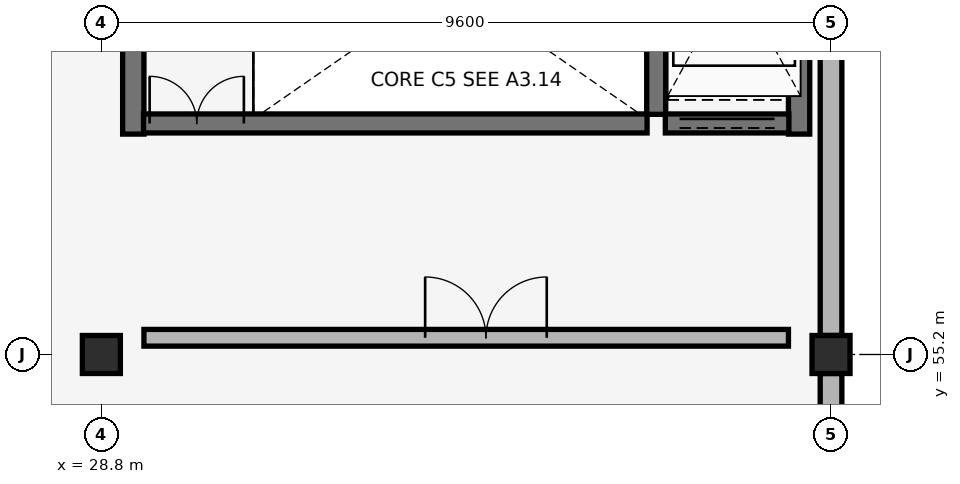
"""IFC4 building model, lengths in metres.
Left out: names, types, materials, properties, quantities, classifications, styles, units other than length and angle.
Written with IfcOpenShell. Run it as: python <this file> out.ifc"""

import sys

from ifc_helpers import new_model, si_unit, direction, frame, frame_2d, origin, origin_2d, place, context, subcontext, project, spatial, rectangle, extrude, element, fill, save


model = new_model("IFC4")
c1 = context("Model", 3, precision=1e-05, world=origin(), true_north=direction((0.0, 1.0)))
c2 = subcontext(c1, "Body", "Model", "MODEL_VIEW")
j1 = project(units=[si_unit("LENGTHUNIT", "METRE"), si_unit("PLANEANGLEUNIT", "RADIAN")], contexts=[c1])
p1 = place(None, origin())
s1 = spatial("IfcSite", under=j1, at=p1, CompositionType="ELEMENT")
p2 = place(p1, origin())
s2 = spatial("IfcBuilding", under=s1, at=p2, CompositionType="ELEMENT")
p3 = place(p2, frame((0.0, 0.0, 12.58)))
s3 = spatial("IfcBuildingStorey", under=s2, at=p3, CompositionType="ELEMENT", Elevation=12.58)
for number, where, z_axis, x_axis in (
    (1, (28.8, 55.2, 0.0), (0.0, 0.0, 1.0), (1.0, 0.0, 0.0)),
    (2, (38.4, 55.2, 0.0), (0.0, 0.0, 1.0), (1.0, 0.0, 0.0)),
):
    element("IfcColumn", number, at=place(p3, frame(where, z_axis=z_axis, x_axis=x_axis)), inside=s3, PredefinedType="COLUMN", context=c2, shape_type="SweptSolid", body=[
        extrude(rectangle(XDim=0.5, YDim=0.5, at=origin_2d()), origin(), (0.0, 0.0, 1.0), 4.08),
    ])
p4 = place(p3, frame((38.4, 48.25, 0.0), z_axis=(0.0, 0.0, 1.0), x_axis=(0.0, 1.0, 0.0)))
e3 = element("IfcWall", 3, at=p4, inside=s3, PredefinedType="SOLIDWALL", context=c2, shape_type="SweptSolid", body=[
    extrude(rectangle(XDim=6.7, YDim=0.285, at=frame_2d((3.35, 0.0))), origin(), (0.0, 0.0, 1.0), 3.06),
])
p5 = place(p4, frame((1.165, 0.0, 0.88)))
e4 = element("IfcOpeningElement", 4, at=p5, cuts=e3, PredefinedType="OPENING", context=c2, shape_type="SweptSolid", body=[
    extrude(rectangle(XDim=1.02, YDim=1.88, at=frame_2d((0.51, 0.94))), frame((0.0, 0.152, 0.0), z_axis=(0.0, -1.0, 0.0), x_axis=(1.0, 0.0, 0.0)), (0.0, 0.0, 1.0), 0.305),
])
p6 = place(p4, frame((2.84, 0.0, 0.88)))
e5 = element("IfcOpeningElement", 5, at=p6, cuts=e3, PredefinedType="OPENING", context=c2, shape_type="SweptSolid", body=[
    extrude(rectangle(XDim=1.02, YDim=1.88, at=frame_2d((0.51, 0.94))), frame((0.0, 0.152, 0.0), z_axis=(0.0, -1.0, 0.0), x_axis=(1.0, 0.0, 0.0)), (0.0, 0.0, 1.0), 0.305),
])
p7 = place(p4, frame((4.515, 0.0, 0.88)))
e6 = element("IfcOpeningElement", 6, at=p7, cuts=e3, PredefinedType="OPENING", context=c2, shape_type="SweptSolid", body=[
    extrude(rectangle(XDim=1.02, YDim=1.88, at=frame_2d((0.51, 0.94))), frame((0.0, 0.152, 0.0), z_axis=(0.0, -1.0, 0.0), x_axis=(1.0, 0.0, 0.0)), (0.0, 0.0, 1.0), 0.305),
])
p8 = place(p3, frame((38.4, 55.45, 0.0), z_axis=(0.0, 0.0, 1.0), x_axis=(0.0, 1.0, 0.0)))
e7 = element("IfcWall", 7, at=p8, inside=s3, PredefinedType="SOLIDWALL", context=c2, shape_type="SweptSolid", body=[
    extrude(rectangle(XDim=6.7, YDim=0.285, at=frame_2d((3.35, 0.0))), origin(), (0.0, 0.0, 1.0), 3.06),
])
for number, where, z_axis, x_axis in (
    (8, (29.22, 58.1, 0.0), (0.0, 0.0, 1.0), (0.0, 1.0, 0.0)),
    (9, (37.98, 58.1, 0.0), (0.0, 0.0, 1.0), (0.0, 1.0, 0.0)),
):
    element("IfcWall", number, at=place(p3, frame(where, z_axis=z_axis, x_axis=x_axis)), inside=s3, PredefinedType="SHEAR", context=c2, shape_type="SweptSolid", body=[
        extrude(rectangle(XDim=4.08, YDim=0.28, at=frame_2d((2.04, 0.0))), origin(), (0.0, 0.0, 1.0), 3.78),
    ])
p9 = place(p3, frame((36.1, 58.36, 0.0), z_axis=(0.0, 0.0, 1.0), x_axis=(0.0, 1.0, 0.0)))
e10 = element("IfcWall", 10, at=p9, inside=s3, PredefinedType="SHEAR", context=c2, shape_type="SweptSolid", body=[
    extrude(rectangle(XDim=3.54, YDim=0.25, at=frame_2d((1.77, 0.0))), origin(), (0.0, 0.0, 1.0), 3.78),
])
p10 = place(p3, frame((29.355, 58.24, 0.0), z_axis=(0.0, 0.0, 1.0), x_axis=(1.0, 0.0, 0.0)))
e11 = element("IfcWall", 11, at=p10, inside=s3, PredefinedType="SHEAR", context=c2, shape_type="SweptSolid", body=[
    extrude(rectangle(XDim=6.625, YDim=0.25, at=frame_2d((3.312, 0.0))), origin(), (0.0, 0.0, 1.0), 3.78),
])
p11 = place(p10, frame((0.08, 0.0, 0.0)))
e12 = element("IfcOpeningElement", 12, at=p11, cuts=e11, PredefinedType="OPENING", context=c2, shape_type="SweptSolid", body=[
    extrude(rectangle(XDim=1.24, YDim=2.15, at=frame_2d((0.62, 1.075))), frame((0.0, 0.135, 0.0), z_axis=(0.0, -1.0, 0.0), x_axis=(1.0, 0.0, 0.0)), (0.0, 0.0, 1.0), 0.27),
])
p12 = place(p3, frame((29.36, 55.42, 0.0), z_axis=(0.0, 0.0, 1.0), x_axis=(1.0, 0.0, 0.0)))
e13 = element("IfcWall", 13, at=p12, inside=s3, PredefinedType="PARTITIONING", context=c2, shape_type="SweptSolid", body=[
    extrude(rectangle(XDim=8.48, YDim=0.22, at=frame_2d((4.24, 0.0))), origin(), (0.0, 0.0, 1.0), 3.19),
])
p13 = place(p12, frame((3.7, 0.0, 0.0)))
e14 = element("IfcOpeningElement", 14, at=p13, cuts=e13, PredefinedType="OPENING", context=c2, shape_type="SweptSolid", body=[
    extrude(rectangle(XDim=1.6, YDim=2.2, at=frame_2d((0.8, 1.1))), frame((0.0, 0.12, 0.0), z_axis=(0.0, -1.0, 0.0), x_axis=(1.0, 0.0, 0.0)), (0.0, 0.0, 1.0), 0.24),
])
p14 = place(p3, frame((36.22, 58.24, 0.0), z_axis=(0.0, 0.0, 1.0), x_axis=(1.0, 0.0, 0.0)))
e15 = element("IfcWall", 15, at=p14, inside=s3, PredefinedType="SHEAR", context=c2, shape_type="SweptSolid", body=[
    extrude(rectangle(XDim=1.625, YDim=0.25, at=frame_2d((0.812, 0.0))), origin(), (0.0, 0.0, 1.0), 3.78),
])
p15 = place(p14, frame((0.188, 0.0, 0.0)))
e16 = element("IfcOpeningElement", 16, at=p15, cuts=e15, PredefinedType="OPENING", context=c2, shape_type="SweptSolid", body=[
    extrude(rectangle(XDim=1.25, YDim=2.15, at=frame_2d((0.625, 1.075))), frame((0.0, 0.135, 0.0), z_axis=(0.0, -1.0, 0.0), x_axis=(1.0, 0.0, 0.0)), (0.0, 0.0, 1.0), 0.27),
])
p16 = place(p11, origin())
e17 = element("IfcDoor", 17, at=p16, inside=s3, OperationType="DOUBLE_DOOR_SINGLE_SWING", PredefinedType="DOOR", context=c2, shape_type="SweptSolid", body=[
    extrude(rectangle(XDim=1.24, YDim=2.15, at=frame_2d((0.62, 1.075))), frame((0.0, 0.025, 0.0), z_axis=(0.0, -1.0, 0.0), x_axis=(1.0, 0.0, 0.0)), (0.0, 0.0, 1.0), 0.05),
])
fill(e12, e17)
p17 = place(p13, origin())
e18 = element("IfcDoor", 18, at=p17, inside=s3, OperationType="DOUBLE_DOOR_SINGLE_SWING", PredefinedType="DOOR", context=c2, shape_type="SweptSolid", body=[
    extrude(rectangle(XDim=1.6, YDim=2.2, at=frame_2d((0.8, 1.1))), frame((0.0, 0.025, 0.0), z_axis=(0.0, -1.0, 0.0), x_axis=(1.0, 0.0, 0.0)), (0.0, 0.0, 1.0), 0.05),
])
fill(e14, e18)
p18 = place(p15, origin())
e19 = element("IfcDoor", 19, at=p18, inside=s3, OperationType="DOUBLE_DOOR_SLIDING", PredefinedType="DOOR", context=c2, shape_type="SweptSolid", body=[
    extrude(rectangle(XDim=1.25, YDim=2.15, at=frame_2d((0.625, 1.075))), frame((0.0, 0.025, 0.0), z_axis=(0.0, -1.0, 0.0), x_axis=(1.0, 0.0, 0.0)), (0.0, 0.0, 1.0), 0.05),
])
fill(e16, e19)
save(model, sys.argv[1])
